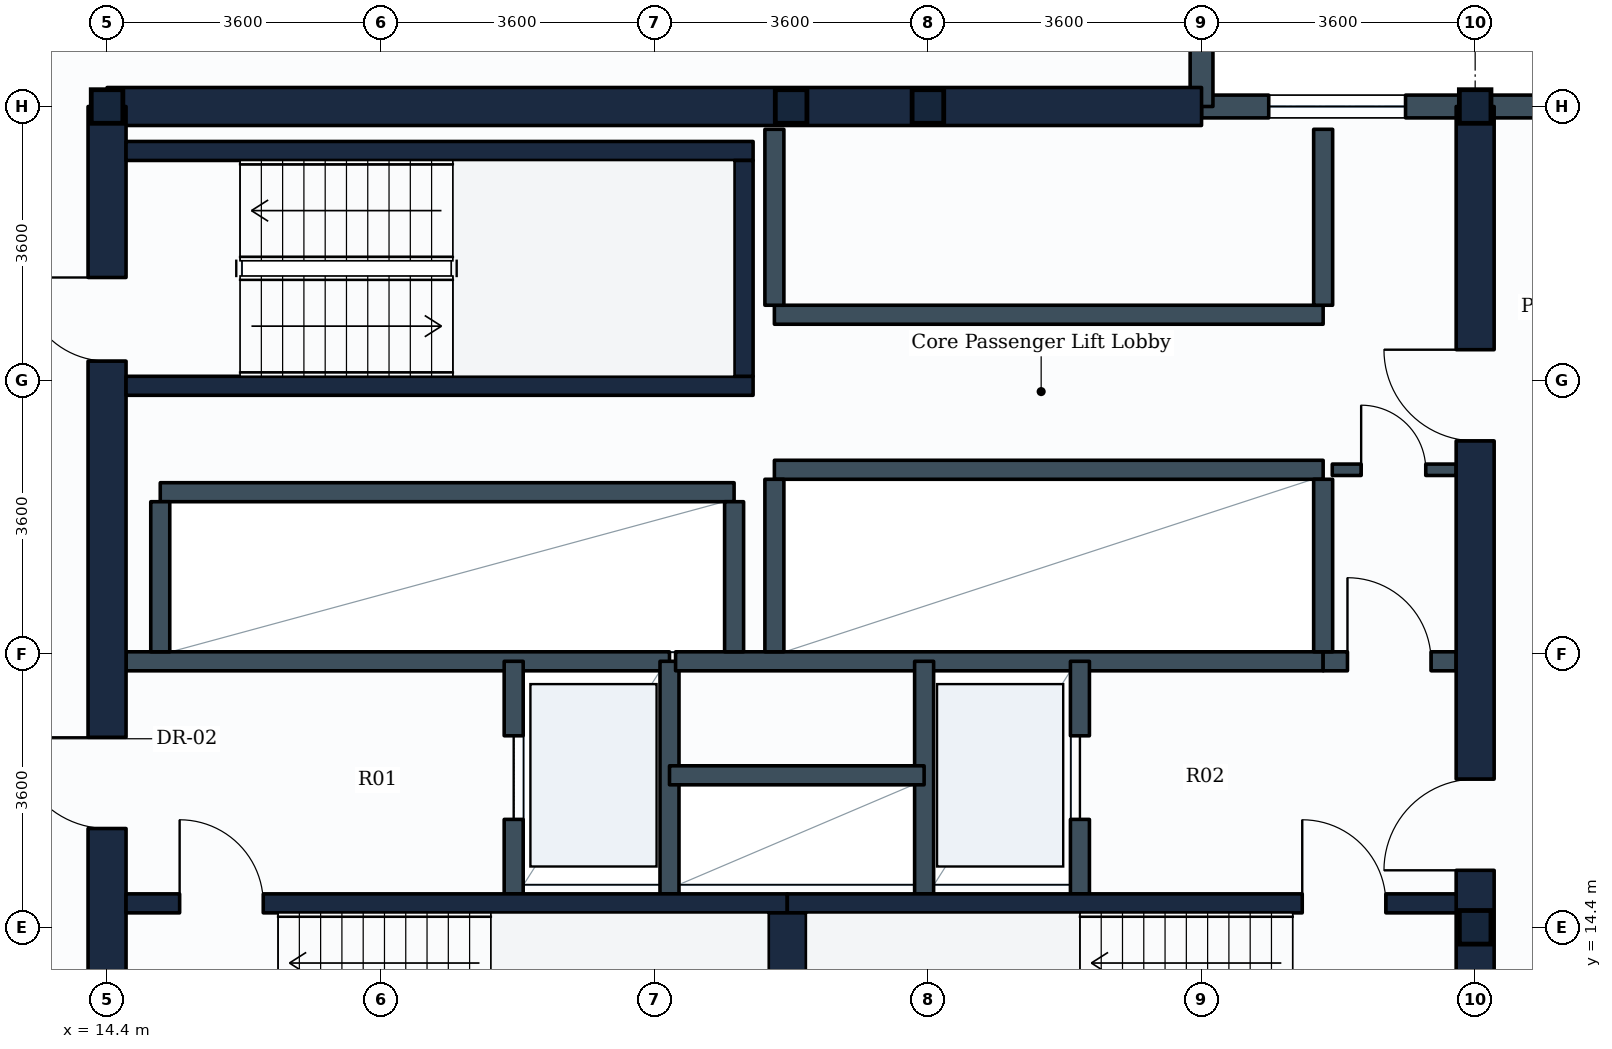
"""IFC4 building model, lengths in metres.
Left out: names, types, materials, properties, quantities, classifications, styles, units other than length and angle.
Written with IfcOpenShell. Run it as: python <this file> out.ifc"""

import sys

from ifc_helpers import new_model, si_unit, direction, frame, frame_2d, origin, origin_2d, place, context, subcontext, project, spatial, rectangle, i_section, extrude, element, fill, save


model = new_model("IFC4")
c1 = context("Model", 3, precision=1e-05, world=origin(), true_north=direction((0.0, 1.0)))
c2 = subcontext(c1, "Body", "Model", "MODEL_VIEW")
j1 = project(units=[si_unit("LENGTHUNIT", "METRE"), si_unit("PLANEANGLEUNIT", "RADIAN")], contexts=[c1])
p1 = place(None, origin())
s1 = spatial("IfcSite", under=j1, at=p1, CompositionType="ELEMENT")
p2 = place(p1, origin())
s2 = spatial("IfcBuilding", under=s1, at=p2, CompositionType="ELEMENT")
p3 = place(p2, frame((0.0, 0.0, 120.0)))
s3 = spatial("IfcBuildingStorey", under=s2, at=p3, CompositionType="ELEMENT", Elevation=120.0)
for number, where, z_axis, x_axis in (
    (1, (14.4, 25.2, 0.0), (0.0, 0.0, 1.0), (1.0, 0.0, 0.0)),
    (2, (23.4, 25.2, 0.0), (0.0, 0.0, 1.0), (1.0, 0.0, 0.0)),
    (3, (25.2, 25.2, 0.0), (0.0, 0.0, 1.0), (1.0, 0.0, 0.0)),
    (4, (32.4, 14.4, 0.0), (0.0, 0.0, 1.0), (1.0, 0.0, 0.0)),
    (5, (32.4, 25.2, 0.0), (0.0, 0.0, 1.0), (1.0, 0.0, 0.0)),
):
    element("IfcColumn", number, at=place(p3, frame(where, z_axis=z_axis, x_axis=x_axis)), inside=s3, PredefinedType="COLUMN", context=c2, shape_type="SweptSolid", body=[
        extrude(i_section(OverallWidth=0.416, OverallDepth=0.442, WebThickness=0.025, FlangeThickness=0.041, FilletRadius=0.015, at=origin_2d()), origin(), (0.0, 0.0, 1.0), 3.8),
    ])
p4 = place(p3, frame((32.4, 25.2, 0.0), z_axis=(0.0, 0.0, 1.0), x_axis=(1.0, 0.0, 0.0)))
e6 = element("IfcWall", 6, at=p4, inside=s3, PredefinedType="STANDARD", context=c2, shape_type="SweptSolid", body=[
    extrude(rectangle(XDim=3.6, YDim=0.3, at=frame_2d((1.8, 0.0))), origin(), (0.0, 0.0, 1.0), 2.93),
])
p5 = place(p3, frame((28.8, 25.2, 0.0), z_axis=(0.0, 0.0, 1.0), x_axis=(1.0, 0.0, 0.0)))
e7 = element("IfcWall", 7, at=p5, inside=s3, PredefinedType="STANDARD", context=c2, shape_type="SweptSolid", body=[
    extrude(rectangle(XDim=3.6, YDim=0.3, at=frame_2d((1.8, 0.0))), origin(), (0.0, 0.0, 1.0), 3.535),
])
p6 = place(p5, frame((0.884, 0.0, 0.85)))
e8 = element("IfcOpeningElement", 8, at=p6, cuts=e7, PredefinedType="OPENING", context=c2, shape_type="SweptSolid", body=[
    extrude(rectangle(XDim=1.8, YDim=1.35, at=frame_2d((0.9, 0.675))), frame((0.0, 0.16, 0.0), z_axis=(0.0, -1.0, 0.0), x_axis=(1.0, 0.0, 0.0)), (0.0, 0.0, 1.0), 0.32),
])
p7 = place(p3, frame((28.8, 28.8, 0.0), z_axis=(0.0, 0.0, 1.0), x_axis=(0.0, -1.0, 0.0)))
e9 = element("IfcWall", 9, at=p7, inside=s3, PredefinedType="STANDARD", context=c2, shape_type="SweptSolid", body=[
    extrude(rectangle(XDim=3.6, YDim=0.3, at=frame_2d((1.8, 0.0))), origin(), (0.0, 0.0, 1.0), 3.09),
])
p8 = place(p3, frame((14.4, 25.2, 0.0), z_axis=(0.0, 0.0, 1.0), x_axis=(1.0, 0.0, 0.0)))
e10 = element("IfcWall", 10, at=p8, inside=s3, PredefinedType="SHEAR", context=c2, shape_type="SweptSolid", body=[
    extrude(rectangle(XDim=14.4, YDim=0.5, at=frame_2d((7.2, 0.0))), origin(), (0.0, 0.0, 1.0), 3.55),
])
p9 = place(p3, frame((14.4, 10.8, 0.0), z_axis=(0.0, 0.0, 1.0), x_axis=(0.0, 1.0, 0.0)))
e11 = element("IfcWall", 11, at=p9, inside=s3, PredefinedType="SHEAR", context=c2, shape_type="SweptSolid", body=[
    extrude(rectangle(XDim=14.4, YDim=0.5, at=frame_2d((7.2, 0.0))), origin(), (0.0, 0.0, 1.0), 3.55),
])
p10 = place(p9, frame((11.05, 0.0, 0.0)))
e12 = element("IfcOpeningElement", 12, at=p10, cuts=e11, PredefinedType="OPENING", context=c2, shape_type="SweptSolid", body=[
    extrude(rectangle(XDim=1.1, YDim=2.1, at=frame_2d((0.55, 1.05))), frame((0.0, 0.26, 0.0), z_axis=(0.0, -1.0, 0.0), x_axis=(1.0, 0.0, 0.0)), (0.0, 0.0, 1.0), 0.52),
])
p11 = place(p9, frame((4.9, 0.0, 0.0)))
e13 = element("IfcOpeningElement", 13, at=p11, cuts=e11, PredefinedType="OPENING", context=c2, shape_type="SweptSolid", body=[
    extrude(rectangle(XDim=1.2, YDim=2.1, at=frame_2d((0.6, 1.05))), frame((0.0, 0.26, 0.0), z_axis=(0.0, -1.0, 0.0), x_axis=(1.0, 0.0, 0.0)), (0.0, 0.0, 1.0), 0.52),
])
p12 = place(p3, frame((32.4, 10.8, 0.0), z_axis=(0.0, 0.0, 1.0), x_axis=(0.0, 1.0, 0.0)))
e14 = element("IfcWall", 14, at=p12, inside=s3, PredefinedType="SHEAR", context=c2, shape_type="SweptSolid", body=[
    extrude(rectangle(XDim=14.4, YDim=0.5, at=frame_2d((7.2, 0.0))), origin(), (0.0, 0.0, 1.0), 3.55),
])
p13 = place(p12, frame((4.35, 0.0, 0.0)))
e15 = element("IfcOpeningElement", 15, at=p13, cuts=e14, PredefinedType="OPENING", context=c2, shape_type="SweptSolid", body=[
    extrude(rectangle(XDim=1.2, YDim=2.1, at=frame_2d((0.6, 1.05))), frame((0.0, 0.26, 0.0), z_axis=(0.0, -1.0, 0.0), x_axis=(1.0, 0.0, 0.0)), (0.0, 0.0, 1.0), 0.52),
])
p14 = place(p12, frame((10.0, 0.0, 0.0)))
e16 = element("IfcOpeningElement", 16, at=p14, cuts=e14, PredefinedType="OPENING", context=c2, shape_type="SweptSolid", body=[
    extrude(rectangle(XDim=1.2, YDim=2.1, at=frame_2d((0.6, 1.05))), frame((0.0, 0.26, 0.0), z_axis=(0.0, -1.0, 0.0), x_axis=(1.0, 0.0, 0.0)), (0.0, 0.0, 1.0), 0.52),
])
p15 = place(p3, frame((14.65, 14.715, 0.0), z_axis=(0.0, 0.0, 1.0), x_axis=(1.0, 0.0, 0.0)))
e17 = element("IfcWall", 17, at=p15, inside=s3, PredefinedType="SHEAR", context=c2, shape_type="SweptSolid", body=[
    extrude(rectangle(XDim=8.7, YDim=0.25, at=frame_2d((4.35, 0.0))), origin(), (0.0, 0.0, 1.0), 3.55),
])
p16 = place(p15, frame((0.705, 0.0, 0.0)))
e18 = element("IfcOpeningElement", 18, at=p16, cuts=e17, PredefinedType="OPENING", context=c2, shape_type="SweptSolid", body=[
    extrude(rectangle(XDim=1.1, YDim=2.1, at=frame_2d((0.55, 1.05))), frame((0.0, 0.135, 0.0), z_axis=(0.0, -1.0, 0.0), x_axis=(1.0, 0.0, 0.0)), (0.0, 0.0, 1.0), 0.27),
])
p17 = place(p3, frame((23.35, 14.715, 0.0), z_axis=(0.0, 0.0, 1.0), x_axis=(1.0, 0.0, 0.0)))
e19 = element("IfcWall", 19, at=p17, inside=s3, PredefinedType="SHEAR", context=c2, shape_type="SweptSolid", body=[
    extrude(rectangle(XDim=8.8, YDim=0.25, at=frame_2d((4.4, 0.0))), origin(), (0.0, 0.0, 1.0), 3.55),
])
p18 = place(p17, frame((6.775, 0.0, 0.0)))
e20 = element("IfcOpeningElement", 20, at=p18, cuts=e19, PredefinedType="OPENING", context=c2, shape_type="SweptSolid", body=[
    extrude(rectangle(XDim=1.1, YDim=2.1, at=frame_2d((0.55, 1.05))), frame((0.0, 0.135, 0.0), z_axis=(0.0, -1.0, 0.0), x_axis=(1.0, 0.0, 0.0)), (0.0, 0.0, 1.0), 0.27),
])
p19 = place(p3, frame((23.35, 11.75, 0.0), z_axis=(0.0, 0.0, 1.0), x_axis=(0.0, 1.0, 0.0)))
e21 = element("IfcWall", 21, at=p19, inside=s3, PredefinedType="SHEAR", context=c2, shape_type="SweptSolid", body=[
    extrude(rectangle(XDim=2.84, YDim=0.5, at=frame_2d((1.42, 0.0))), origin(), (0.0, 0.0, 1.0), 3.55),
])
for number, where, z_axis, x_axis in (
    (22, (14.65, 21.525, 0.0), (0.0, 0.0, 1.0), (1.0, 0.0, 0.0)),
    (23, (14.65, 24.615, 0.0), (0.0, 0.0, 1.0), (1.0, 0.0, 0.0)),
):
    element("IfcWall", number, at=place(p3, frame(where, z_axis=z_axis, x_axis=x_axis)), inside=s3, PredefinedType="SHEAR", context=c2, shape_type="SweptSolid", body=[
        extrude(rectangle(XDim=8.25, YDim=0.25, at=frame_2d((4.125, 0.0))), origin(), (0.0, 0.0, 1.0), 3.55),
    ])
p20 = place(p3, frame((22.775, 21.65, 0.0), z_axis=(0.0, 0.0, 1.0), x_axis=(0.0, 1.0, 0.0)))
e24 = element("IfcWall", 24, at=p20, inside=s3, PredefinedType="SHEAR", context=c2, shape_type="SweptSolid", body=[
    extrude(rectangle(XDim=2.84, YDim=0.25, at=frame_2d((1.42, 0.0))), origin(), (0.0, 0.0, 1.0), 3.55),
])
p21 = place(p3, frame((14.65, 17.9, 0.0), z_axis=(0.0, 0.0, 1.0), x_axis=(1.0, 0.0, 0.0)))
e25 = element("IfcWall", 25, at=p21, inside=s3, PredefinedType="PARTITIONING", context=c2, shape_type="SweptSolid", body=[
    extrude(rectangle(XDim=7.15, YDim=0.25, at=frame_2d((3.575, 0.0))), origin(), (0.0, 0.0, 1.0), 3.535),
])
p22 = place(p3, frame((19.75, 14.84, 0.0), z_axis=(0.0, 0.0, 1.0), x_axis=(0.0, 1.0, 0.0)))
e26 = element("IfcWall", 26, at=p22, inside=s3, PredefinedType="PARTITIONING", context=c2, shape_type="SweptSolid", body=[
    extrude(rectangle(XDim=3.06, YDim=0.25, at=frame_2d((1.53, 0.0))), origin(), (0.0, 0.0, 1.0), 3.535),
])
p23 = place(p22, frame((0.98, 0.0, 0.0)))
e27 = element("IfcOpeningElement", 27, at=p23, cuts=e26, PredefinedType="OPENING", context=c2, shape_type="SweptSolid", body=[
    extrude(rectangle(XDim=1.1, YDim=2.1, at=frame_2d((0.55, 1.05))), frame((0.0, 0.135, 0.0), z_axis=(0.0, -1.0, 0.0), x_axis=(1.0, 0.0, 0.0)), (0.0, 0.0, 1.0), 0.27),
])
p24 = place(p3, frame((21.8, 14.84, 0.0), z_axis=(0.0, 0.0, 1.0), x_axis=(0.0, 1.0, 0.0)))
e28 = element("IfcWall", 28, at=p24, inside=s3, PredefinedType="PARTITIONING", context=c2, shape_type="SweptSolid", body=[
    extrude(rectangle(XDim=3.06, YDim=0.25, at=frame_2d((1.53, 0.0))), origin(), (0.0, 0.0, 1.0), 3.535),
])
p25 = place(p3, frame((21.88, 17.9, 0.0), z_axis=(0.0, 0.0, 1.0), x_axis=(1.0, 0.0, 0.0)))
e29 = element("IfcWall", 29, at=p25, inside=s3, PredefinedType="PARTITIONING", context=c2, shape_type="SweptSolid", body=[
    extrude(rectangle(XDim=8.52, YDim=0.25, at=frame_2d((4.26, 0.0))), origin(), (0.0, 0.0, 1.0), 3.535),
])
p26 = place(p3, frame((30.4, 17.9, 0.0), z_axis=(0.0, 0.0, 1.0), x_axis=(1.0, 0.0, 0.0)))
e30 = element("IfcWall", 30, at=p26, inside=s3, PredefinedType="PARTITIONING", context=c2, shape_type="SweptSolid", body=[
    extrude(rectangle(XDim=1.75, YDim=0.25, at=frame_2d((0.875, 0.0))), origin(), (0.0, 0.0, 1.0), 3.535),
])
p27 = place(p26, frame((0.32, 0.0, 0.0)))
e31 = element("IfcOpeningElement", 31, at=p27, cuts=e30, PredefinedType="OPENING", context=c2, shape_type="SweptSolid", body=[
    extrude(rectangle(XDim=1.1, YDim=2.1, at=frame_2d((0.55, 1.05))), frame((0.0, 0.135, 0.0), z_axis=(0.0, -1.0, 0.0), x_axis=(1.0, 0.0, 0.0)), (0.0, 0.0, 1.0), 0.27),
])
p28 = place(p3, frame((25.15, 14.84, 0.0), z_axis=(0.0, 0.0, 1.0), x_axis=(0.0, 1.0, 0.0)))
e32 = element("IfcWall", 32, at=p28, inside=s3, PredefinedType="PARTITIONING", context=c2, shape_type="SweptSolid", body=[
    extrude(rectangle(XDim=3.06, YDim=0.25, at=frame_2d((1.53, 0.0))), origin(), (0.0, 0.0, 1.0), 3.535),
])
p29 = place(p3, frame((27.2, 14.84, 0.0), z_axis=(0.0, 0.0, 1.0), x_axis=(0.0, 1.0, 0.0)))
e33 = element("IfcWall", 33, at=p29, inside=s3, PredefinedType="PARTITIONING", context=c2, shape_type="SweptSolid", body=[
    extrude(rectangle(XDim=3.06, YDim=0.25, at=frame_2d((1.53, 0.0))), origin(), (0.0, 0.0, 1.0), 3.535),
])
p30 = place(p29, frame((0.98, 0.0, 0.0)))
e34 = element("IfcOpeningElement", 34, at=p30, cuts=e33, PredefinedType="OPENING", context=c2, shape_type="SweptSolid", body=[
    extrude(rectangle(XDim=1.1, YDim=2.1, at=frame_2d((0.55, 1.05))), frame((0.0, 0.135, 0.0), z_axis=(0.0, -1.0, 0.0), x_axis=(1.0, 0.0, 0.0)), (0.0, 0.0, 1.0), 0.27),
])
p31 = place(p3, frame((21.8, 16.4, 0.0), z_axis=(0.0, 0.0, 1.0), x_axis=(1.0, 0.0, 0.0)))
e35 = element("IfcWall", 35, at=p31, inside=s3, PredefinedType="PARTITIONING", context=c2, shape_type="SweptSolid", body=[
    extrude(rectangle(XDim=3.35, YDim=0.25, at=frame_2d((1.675, 0.0))), origin(), (0.0, 0.0, 1.0), 3.535),
])
p32 = place(p3, frame((15.1, 20.125, 0.0), z_axis=(0.0, 0.0, 1.0), x_axis=(1.0, 0.0, 0.0)))
e36 = element("IfcWall", 36, at=p32, inside=s3, PredefinedType="PARTITIONING", context=c2, shape_type="SweptSolid", body=[
    extrude(rectangle(XDim=7.55, YDim=0.25, at=frame_2d((3.775, 0.0))), origin(), (0.0, 0.0, 1.0), 3.535),
])
for number, where, z_axis, x_axis in (
    (37, (15.1, 18.025, 0.0), (0.0, 0.0, 1.0), (0.0, 1.0, 0.0)),
    (38, (22.65, 18.025, 0.0), (0.0, 0.0, 1.0), (0.0, 1.0, 0.0)),
):
    element("IfcWall", number, at=place(p3, frame(where, z_axis=z_axis, x_axis=x_axis)), inside=s3, PredefinedType="PARTITIONING", context=c2, shape_type="SweptSolid", body=[
        extrude(rectangle(XDim=1.975, YDim=0.25, at=frame_2d((0.988, 0.0))), origin(), (0.0, 0.0, 1.0), 3.535),
    ])
p33 = place(p3, frame((23.18, 20.42, 0.0), z_axis=(0.0, 0.0, 1.0), x_axis=(1.0, 0.0, 0.0)))
e39 = element("IfcWall", 39, at=p33, inside=s3, PredefinedType="PARTITIONING", context=c2, shape_type="SweptSolid", body=[
    extrude(rectangle(XDim=7.22, YDim=0.25, at=frame_2d((3.61, 0.0))), origin(), (0.0, 0.0, 1.0), 3.535),
])
for number, where, z_axis, x_axis in (
    (40, (23.18, 18.025, 0.0), (0.0, 0.0, 1.0), (0.0, 1.0, 0.0)),
    (41, (30.4, 18.025, 0.0), (0.0, 0.0, 1.0), (0.0, 1.0, 0.0)),
):
    element("IfcWall", number, at=place(p3, frame(where, z_axis=z_axis, x_axis=x_axis)), inside=s3, PredefinedType="PARTITIONING", context=c2, shape_type="SweptSolid", body=[
        extrude(rectangle(XDim=2.27, YDim=0.25, at=frame_2d((1.135, 0.0))), origin(), (0.0, 0.0, 1.0), 3.535),
    ])
p34 = place(p3, frame((23.18, 22.46, 0.0), z_axis=(0.0, 0.0, 1.0), x_axis=(1.0, 0.0, 0.0)))
e42 = element("IfcWall", 42, at=p34, inside=s3, PredefinedType="PARTITIONING", context=c2, shape_type="SweptSolid", body=[
    extrude(rectangle(XDim=7.22, YDim=0.25, at=frame_2d((3.61, 0.0))), origin(), (0.0, 0.0, 1.0), 3.535),
])
for number, where, z_axis, x_axis in (
    (43, (23.18, 22.585, 0.0), (0.0, 0.0, 1.0), (0.0, 1.0, 0.0)),
    (44, (30.4, 22.585, 0.0), (0.0, 0.0, 1.0), (0.0, 1.0, 0.0)),
):
    element("IfcWall", number, at=place(p3, frame(where, z_axis=z_axis, x_axis=x_axis)), inside=s3, PredefinedType="PARTITIONING", context=c2, shape_type="SweptSolid", body=[
        extrude(rectangle(XDim=2.315, YDim=0.25, at=frame_2d((1.157, 0.0))), origin(), (0.0, 0.0, 1.0), 3.535),
    ])
p35 = place(p3, frame((30.52, 20.42, 0.0), z_axis=(0.0, 0.0, 1.0), x_axis=(1.0, 0.0, 0.0)))
e45 = element("IfcWall", 45, at=p35, inside=s3, PredefinedType="PARTITIONING", context=c2, shape_type="SweptSolid", body=[
    extrude(rectangle(XDim=1.63, YDim=0.15, at=frame_2d((0.815, 0.0))), origin(), (0.0, 0.0, 1.0), 3.535),
])
p36 = place(p35, frame((0.38, 0.0, 0.0)))
e46 = element("IfcOpeningElement", 46, at=p36, cuts=e45, PredefinedType="OPENING", context=c2, shape_type="SweptSolid", body=[
    extrude(rectangle(XDim=0.85, YDim=2.1, at=frame_2d((0.425, 1.05))), frame((0.0, 0.085, 0.0), z_axis=(0.0, -1.0, 0.0), x_axis=(1.0, 0.0, 0.0)), (0.0, 0.0, 1.0), 0.17),
])
p37 = place(p6, origin())
e47 = element("IfcWindow", 47, at=p37, inside=s3, PartitioningType="SINGLE_PANEL", PredefinedType="WINDOW", context=c2, shape_type="SweptSolid", body=[
    extrude(rectangle(XDim=1.8, YDim=1.35, at=frame_2d((0.9, 0.675))), frame((0.0, 0.03, 0.0), z_axis=(0.0, -1.0, 0.0), x_axis=(1.0, 0.0, 0.0)), (0.0, 0.0, 1.0), 0.06),
])
fill(e8, e47)
p38 = place(p16, origin())
e48 = element("IfcDoor", 48, at=p38, inside=s3, OperationType="SINGLE_SWING_LEFT", PredefinedType="DOOR", context=c2, shape_type="SweptSolid", body=[
    extrude(rectangle(XDim=1.1, YDim=2.1, at=frame_2d((0.55, 1.05))), frame((0.0, 0.025, 0.0), z_axis=(0.0, -1.0, 0.0), x_axis=(1.0, 0.0, 0.0)), (0.0, 0.0, 1.0), 0.05),
])
fill(e18, e48)
p39 = place(p18, origin())
e49 = element("IfcDoor", 49, at=p39, inside=s3, OperationType="SINGLE_SWING_LEFT", PredefinedType="DOOR", context=c2, shape_type="SweptSolid", body=[
    extrude(rectangle(XDim=1.1, YDim=2.1, at=frame_2d((0.55, 1.05))), frame((0.0, 0.025, 0.0), z_axis=(0.0, -1.0, 0.0), x_axis=(1.0, 0.0, 0.0)), (0.0, 0.0, 1.0), 0.05),
])
fill(e20, e49)
p40 = place(p10, origin())
e50 = element("IfcDoor", 50, at=p40, inside=s3, OperationType="SINGLE_SWING_RIGHT", PredefinedType="DOOR", context=c2, shape_type="SweptSolid", body=[
    extrude(rectangle(XDim=1.1, YDim=2.1, at=frame_2d((0.55, 1.05))), frame((0.0, 0.025, 0.0), z_axis=(0.0, -1.0, 0.0), x_axis=(1.0, 0.0, 0.0)), (0.0, 0.0, 1.0), 0.05),
])
fill(e12, e50)
p41 = place(p23, origin())
e51 = element("IfcDoor", 51, at=p41, inside=s3, OperationType="SLIDING_TO_LEFT", PredefinedType="DOOR", context=c2, shape_type="SweptSolid", body=[
    extrude(rectangle(XDim=1.1, YDim=2.1, at=frame_2d((0.55, 1.05))), frame((0.0, 0.025, 0.0), z_axis=(0.0, -1.0, 0.0), x_axis=(1.0, 0.0, 0.0)), (0.0, 0.0, 1.0), 0.05),
])
fill(e27, e51)
p42 = place(p30, origin())
e52 = element("IfcDoor", 52, at=p42, inside=s3, OperationType="SLIDING_TO_LEFT", PredefinedType="DOOR", context=c2, shape_type="SweptSolid", body=[
    extrude(rectangle(XDim=1.1, YDim=2.1, at=frame_2d((0.55, 1.05))), frame((0.0, 0.025, 0.0), z_axis=(0.0, -1.0, 0.0), x_axis=(1.0, 0.0, 0.0)), (0.0, 0.0, 1.0), 0.05),
])
fill(e34, e52)
p43 = place(p11, origin())
e53 = element("IfcDoor", 53, at=p43, inside=s3, OperationType="SINGLE_SWING_RIGHT", PredefinedType="DOOR", context=c2, shape_type="SweptSolid", body=[
    extrude(rectangle(XDim=1.2, YDim=2.1, at=frame_2d((0.6, 1.05))), frame((0.0, 0.025, 0.0), z_axis=(0.0, -1.0, 0.0), x_axis=(1.0, 0.0, 0.0)), (0.0, 0.0, 1.0), 0.05),
])
fill(e13, e53)
p44 = place(p13, origin())
e54 = element("IfcDoor", 54, at=p44, inside=s3, OperationType="SINGLE_SWING_LEFT", PredefinedType="DOOR", context=c2, shape_type="SweptSolid", body=[
    extrude(rectangle(XDim=1.2, YDim=2.1, at=frame_2d((0.6, 1.05))), frame((0.0, 0.025, 0.0), z_axis=(0.0, -1.0, 0.0), x_axis=(1.0, 0.0, 0.0)), (0.0, 0.0, 1.0), 0.05),
])
fill(e15, e54)
p45 = place(p27, origin())
e55 = element("IfcDoor", 55, at=p45, inside=s3, OperationType="SINGLE_SWING_LEFT", PredefinedType="DOOR", context=c2, shape_type="SweptSolid", body=[
    extrude(rectangle(XDim=1.1, YDim=2.1, at=frame_2d((0.55, 1.05))), frame((0.0, 0.025, 0.0), z_axis=(0.0, -1.0, 0.0), x_axis=(1.0, 0.0, 0.0)), (0.0, 0.0, 1.0), 0.05),
])
fill(e31, e55)
p46 = place(p14, origin())
e56 = element("IfcDoor", 56, at=p46, inside=s3, OperationType="SINGLE_SWING_RIGHT", PredefinedType="DOOR", context=c2, shape_type="SweptSolid", body=[
    extrude(rectangle(XDim=1.2, YDim=2.1, at=frame_2d((0.6, 1.05))), frame((0.0, 0.025, 0.0), z_axis=(0.0, -1.0, 0.0), x_axis=(1.0, 0.0, 0.0)), (0.0, 0.0, 1.0), 0.05),
])
fill(e16, e56)
p47 = place(p36, origin())
e57 = element("IfcDoor", 57, at=p47, inside=s3, OperationType="SINGLE_SWING_LEFT", PredefinedType="DOOR", context=c2, shape_type="SweptSolid", body=[
    extrude(rectangle(XDim=0.85, YDim=2.1, at=frame_2d((0.425, 1.05))), frame((0.0, 0.025, 0.0), z_axis=(0.0, -1.0, 0.0), x_axis=(1.0, 0.0, 0.0)), (0.0, 0.0, 1.0), 0.05),
])
fill(e46, e57)
save(model, sys.argv[1])
